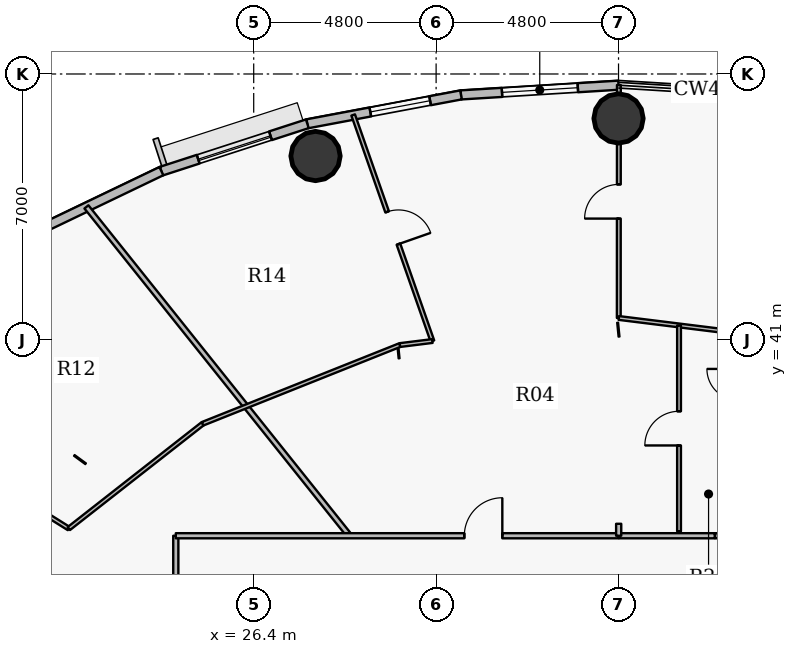
"""IFC4 building model, lengths in metres.
Left out: names, types, materials, properties, quantities, classifications, styles, units other than length and angle.
Written with IfcOpenShell. Run it as: python <this file> out.ifc"""

import sys

from ifc_helpers import new_model, si_unit, direction, frame, frame_2d, origin, origin_2d, place, context, subcontext, project, spatial, rectangle, hollow_circle, extrude, source, transform, mapped, element, fill, save


model = new_model("IFC4")
c1 = context("Model", 3, precision=1e-05, world=origin(), true_north=direction((0.0, 1.0)))
c2 = subcontext(c1, "Body", "Model", "MODEL_VIEW")
j1 = project(units=[si_unit("LENGTHUNIT", "METRE"), si_unit("PLANEANGLEUNIT", "RADIAN")], contexts=[c1])
p1 = place(None, origin())
s1 = spatial("IfcSite", under=j1, at=p1, CompositionType="ELEMENT")
p2 = place(p1, origin())
s2 = spatial("IfcBuilding", under=s1, at=p2, CompositionType="ELEMENT")
p3 = place(p2, frame((0.0, 0.0, 174.9)))
s3 = spatial("IfcBuildingStorey", under=s2, at=p3, CompositionType="ELEMENT", Elevation=174.9)
for number, where, z_axis, x_axis in (
    (1, (36.0, 46.83, 0.0), (0.0, 0.0, 1.0), (1.0, 0.0, 0.0)),
    (2, (28.027, 45.841, 0.0), (0.0, 0.0, 1.0), (1.0, 0.0, 0.0)),
):
    element("IfcColumn", number, at=place(p3, frame(where, z_axis=z_axis, x_axis=x_axis)), inside=s3, PredefinedType="COLUMN", context=c2, shape_type="SweptSolid", body=[
        extrude(hollow_circle(Radius=0.65, WallThickness=0.04, at=origin_2d()), origin(), (0.0, 0.0, 1.0), 3.75),
    ])
p4 = place(p3, frame((31.854, 47.449, 0.0), z_axis=(0.0, 0.0, 1.0), x_axis=(0.998104600619, 0.061540281305, 0.0)))
e3 = element("IfcWall", 3, at=p4, inside=s3, PredefinedType="SOLIDWALL", context=c2, shape_type="SweptSolid", body=[
    extrude(rectangle(XDim=4.154, YDim=0.24, at=frame_2d((2.077, 0.0))), origin(), (0.0, 0.0, 1.0), 3.5),
])
p5 = place(p4, frame((1.082, 0.0, 0.9)))
e4 = element("IfcOpeningElement", 4, at=p5, cuts=e3, PredefinedType="OPENING", context=c2, shape_type="SweptSolid", body=[
    extrude(rectangle(XDim=2.0, YDim=1.75, at=origin_2d()), frame((1.0, 0.13, 0.875), z_axis=(0.0, -1.0, 0.0), x_axis=(1.0, 0.0, 0.0)), (0.0, 0.0, 1.0), 0.26),
])
p6 = place(p3, frame((27.811, 46.689, 0.0), z_axis=(0.0, 0.0, 1.0), x_axis=(0.982788108205, 0.184736391573, 0.0)))
e5 = element("IfcWall", 5, at=p6, inside=s3, PredefinedType="SOLIDWALL", context=c2, shape_type="SweptSolid", body=[
    extrude(rectangle(XDim=4.114, YDim=0.24, at=frame_2d((2.057, 0.0))), origin(), (0.0, 0.0, 1.0), 3.5),
])
p7 = place(p6, frame((1.687, 0.0, 0.9)))
e6 = element("IfcOpeningElement", 6, at=p7, cuts=e5, PredefinedType="OPENING", context=c2, shape_type="SweptSolid", body=[
    extrude(rectangle(XDim=1.6, YDim=1.75, at=origin_2d()), frame((0.8, 0.13, 0.875), z_axis=(0.0, -1.0, 0.0), x_axis=(1.0, 0.0, 0.0)), (0.0, 0.0, 1.0), 0.26),
])
p8 = place(p3, frame((23.97, 45.444, 0.0), z_axis=(0.0, 0.0, 1.0), x_axis=(0.951209870236, 0.30854462038, 0.0)))
e7 = element("IfcWall", 7, at=p8, inside=s3, PredefinedType="SOLIDWALL", context=c2, shape_type="SweptSolid", body=[
    extrude(rectangle(XDim=4.038, YDim=0.24, at=frame_2d((2.019, 0.0))), origin(), (0.0, 0.0, 1.0), 3.5),
])
p9 = place(p8, frame((1.019, 0.0, 0.9)))
e8 = element("IfcOpeningElement", 8, at=p9, cuts=e7, PredefinedType="OPENING", context=c2, shape_type="SweptSolid", body=[
    extrude(rectangle(XDim=2.0, YDim=1.75, at=origin_2d()), frame((1.0, 0.13, 0.875), z_axis=(0.0, -1.0, 0.0), x_axis=(1.0, 0.0, 0.0)), (0.0, 0.0, 1.0), 0.26),
])
p10 = place(p3, frame((20.427, 43.743, 0.0), z_axis=(0.0, 0.0, 1.0), x_axis=(0.901564733809, 0.432644231155, 0.0)))
e9 = element("IfcWall", 9, at=p10, inside=s3, PredefinedType="SOLIDWALL", context=c2, shape_type="SweptSolid", body=[
    extrude(rectangle(XDim=3.93, YDim=0.24, at=frame_2d((1.965, 0.0))), origin(), (0.0, 0.0, 1.0), 3.5),
])
p11 = place(p3, frame((15.366, 39.894, 0.0), z_axis=(0.0, 0.0, 1.0), x_axis=(0.84804732756, -0.529920494242, 0.0)))
e10 = element("IfcWall", 10, at=p11, inside=s3, PredefinedType="PARTITIONING", context=c2, shape_type="SweptSolid", body=[
    extrude(rectangle(XDim=7.274, YDim=0.1, at=frame_2d((3.637, 0.0))), origin(), (0.0, 0.0, 1.0), 2.935),
])
p12 = place(p11, frame((3.187, 0.0, 0.0)))
e11 = element("IfcOpeningElement", 11, at=p12, cuts=e10, PredefinedType="OPENING", context=c2, shape_type="SweptSolid", body=[
    extrude(rectangle(XDim=0.9, YDim=2.1, at=origin_2d()), frame((0.45, 0.06, 1.05), z_axis=(0.0, -1.0, 0.0), x_axis=(1.0, 0.0, 0.0)), (0.0, 0.0, 1.0), 0.12),
])
p13 = place(p3, frame((21.534, 36.039, 0.0), z_axis=(0.0, 0.0, 1.0), x_axis=(0.787313734036, 0.616552580238, 0.0)))
e12 = element("IfcWall", 12, at=p13, inside=s3, PredefinedType="PARTITIONING", context=c2, shape_type="SweptSolid", body=[
    extrude(rectangle(XDim=4.472, YDim=0.1, at=frame_2d((2.236, 0.0))), origin(), (0.0, 0.0, 1.0), 2.935),
])
p14 = place(p3, frame((21.999, 44.503, 0.0), z_axis=(0.0, 0.0, 1.0), x_axis=(0.624673551917, -0.780886005468, 0.0)))
e13 = element("IfcWall", 13, at=p14, inside=s3, PredefinedType="PARTITIONING", context=c2, shape_type="SweptSolid", body=[
    extrude(rectangle(XDim=11.081, YDim=0.135, at=frame_2d((5.541, 0.0))), origin(), (0.0, 0.0, 1.0), 2.935),
])
p15 = place(p3, frame((24.35, 27.95, 0.0), z_axis=(0.0, 0.0, 1.0), x_axis=(0.0, 1.0, 0.0)))
e14 = element("IfcWall", 14, at=p15, inside=s3, PredefinedType="PARTITIONING", context=c2, shape_type="SweptSolid", body=[
    extrude(rectangle(XDim=7.9, YDim=0.135, at=frame_2d((3.95, 0.0))), origin(), (0.0, 0.0, 1.0), 2.935),
])
p16 = place(p15, frame((3.45, 0.0, 0.0)))
e15 = element("IfcOpeningElement", 15, at=p16, cuts=e14, PredefinedType="OPENING", context=c2, shape_type="SweptSolid", body=[
    extrude(rectangle(XDim=1.0, YDim=2.15, at=origin_2d()), frame((0.5, 0.078, 1.075), z_axis=(0.0, -1.0, 0.0), x_axis=(1.0, 0.0, 0.0)), (0.0, 0.0, 1.0), 0.155),
])
p17 = place(p3, frame((24.35, 35.85, 0.0), z_axis=(0.0, 0.0, 1.0), x_axis=(1.0, 0.0, 0.0)))
e16 = element("IfcWall", 16, at=p17, inside=s3, PredefinedType="PARTITIONING", context=c2, shape_type="SweptSolid", body=[
    extrude(rectangle(XDim=11.654, YDim=0.135, at=frame_2d((5.827, 0.0))), origin(), (0.0, 0.0, 1.0), 2.935),
])
p18 = place(p17, frame((7.592, 0.0, 0.0)))
e17 = element("IfcOpeningElement", 17, at=p18, cuts=e16, PredefinedType="OPENING", context=c2, shape_type="SweptSolid", body=[
    extrude(rectangle(XDim=1.0, YDim=2.15, at=origin_2d()), frame((0.5, 0.078, 1.075), z_axis=(0.0, -1.0, 0.0), x_axis=(1.0, 0.0, 0.0)), (0.0, 0.0, 1.0), 0.155),
])
p19 = place(p3, frame((25.055, 38.796, 0.0), z_axis=(0.0, 0.0, 1.0), x_axis=(0.928798710424, 0.370584613166, 0.0)))
e18 = element("IfcWall", 18, at=p19, inside=s3, PredefinedType="PARTITIONING", context=c2, shape_type="SweptSolid", body=[
    extrude(rectangle(XDim=5.589, YDim=0.1, at=frame_2d((2.794, 0.0))), origin(), (0.0, 0.0, 1.0), 2.935),
])
p20 = place(p3, frame((29.018, 46.921, 0.0), z_axis=(0.0, 0.0, 1.0), x_axis=(0.330774858624, -0.943709697366, 0.0)))
e19 = element("IfcWall", 19, at=p20, inside=s3, PredefinedType="PARTITIONING", context=c2, shape_type="SweptSolid", body=[
    extrude(rectangle(XDim=6.302, YDim=0.1, at=frame_2d((3.151, 0.0))), origin(), (0.0, 0.0, 1.0), 2.935),
])
p21 = place(p20, frame((2.701, 0.0, 0.0)))
e20 = element("IfcOpeningElement", 20, at=p21, cuts=e19, PredefinedType="OPENING", context=c2, shape_type="SweptSolid", body=[
    extrude(rectangle(XDim=0.9, YDim=2.1, at=origin_2d()), frame((0.45, 0.06, 1.05), z_axis=(0.0, -1.0, 0.0), x_axis=(1.0, 0.0, 0.0)), (0.0, 0.0, 1.0), 0.12),
])
p22 = place(p3, frame((30.246, 40.867, 0.0), z_axis=(0.0, 0.0, 1.0), x_axis=(0.992394974801, 0.123094329637, 0.0)))
e21 = element("IfcWall", 21, at=p22, inside=s3, PredefinedType="PARTITIONING", context=c2, shape_type="SweptSolid", body=[
    extrude(rectangle(XDim=0.863, YDim=0.1, at=frame_2d((0.431, 0.0))), origin(), (0.0, 0.0, 1.0), 2.935),
])
p23 = place(p3, frame((36.007, 41.58, 0.0), z_axis=(0.0, 0.0, 1.0), x_axis=(0.000477973338, 0.999999885771, 0.0)))
e22 = element("IfcWall", 22, at=p23, inside=s3, PredefinedType="PARTITIONING", context=c2, shape_type="SweptSolid", body=[
    extrude(rectangle(XDim=6.129, YDim=0.1, at=frame_2d((3.065, 0.0))), origin(), (0.0, 0.0, 1.0), 2.935),
])
p24 = place(p23, frame((2.615, 0.0, 0.0)))
e23 = element("IfcOpeningElement", 23, at=p24, cuts=e22, PredefinedType="OPENING", context=c2, shape_type="SweptSolid", body=[
    extrude(rectangle(XDim=0.9, YDim=2.1, at=origin_2d()), frame((0.45, 0.06, 1.05), z_axis=(0.0, -1.0, 0.0), x_axis=(1.0, 0.0, 0.0)), (0.0, 0.0, 1.0), 0.12),
])
p25 = place(p3, frame((36.007, 41.58, 0.0), z_axis=(0.0, 0.0, 1.0), x_axis=(0.992395965764, -0.123086340169, 0.0)))
e24 = element("IfcWall", 24, at=p25, inside=s3, PredefinedType="PARTITIONING", context=c2, shape_type="SweptSolid", body=[
    extrude(rectangle(XDim=4.943, YDim=0.1, at=frame_2d((2.471, 0.0))), origin(), (0.0, 0.0, 1.0), 2.935),
])
p26 = place(p3, frame((37.592, 35.968, 0.0), z_axis=(0.0, 0.0, 1.0), x_axis=(0.0, 1.0, 0.0)))
e25 = element("IfcWall", 25, at=p26, inside=s3, PredefinedType="PARTITIONING", context=c2, shape_type="SweptSolid", body=[
    extrude(rectangle(XDim=5.416, YDim=0.1, at=frame_2d((2.708, 0.0))), origin(), (0.0, 0.0, 1.0), 3.5),
])
p27 = place(p26, frame((2.258, 0.0, 0.0)))
e26 = element("IfcOpeningElement", 26, at=p27, cuts=e25, PredefinedType="OPENING", context=c2, shape_type="SweptSolid", body=[
    extrude(rectangle(XDim=0.9, YDim=2.1, at=origin_2d()), frame((0.45, 0.06, 1.05), z_axis=(0.0, -1.0, 0.0), x_axis=(1.0, 0.0, 0.0)), (0.0, 0.0, 1.0), 0.12),
])
p28 = place(p3, frame((38.541, 35.85, 0.0), z_axis=(0.0, 0.0, 1.0), x_axis=(1.0, 0.0, 0.0)))
e27 = element("IfcWall", 27, at=p28, inside=s3, PredefinedType="PARTITIONING", context=c2, shape_type="SweptSolid", body=[
    extrude(rectangle(XDim=14.913, YDim=0.135, at=frame_2d((7.456, 0.0))), origin(), (0.0, 0.0, 1.0), 2.935),
])
p29 = place(p28, frame((5.868, 0.0, 0.0)))
e28 = element("IfcOpeningElement", 28, at=p29, cuts=e27, PredefinedType="OPENING", context=c2, shape_type="SweptSolid", body=[
    extrude(rectangle(XDim=1.0, YDim=2.15, at=origin_2d()), frame((0.5, 0.078, 1.075), z_axis=(0.0, -1.0, 0.0), x_axis=(1.0, 0.0, 0.0)), (0.0, 0.0, 1.0), 0.155),
])
p30 = place(p3, frame((36.014, 35.85, 0.0), z_axis=(0.0, 0.0, 1.0), x_axis=(1.0, 0.0, 0.0)))
e29 = element("IfcWall", 29, at=p30, inside=s3, PredefinedType="PARTITIONING", context=c2, shape_type="SweptSolid", body=[
    extrude(rectangle(XDim=2.517, YDim=0.135, at=frame_2d((1.259, 0.0))), origin(), (0.0, 0.0, 1.0), 2.935),
])
p31 = place(p3, frame((36.004, 36.165, 0.0), z_axis=(0.0, 0.0, 1.0), x_axis=(0.0, -1.0, 0.0)))
e30 = element("IfcWall", 30, at=p31, inside=s3, PredefinedType="PARTITIONING", context=c2, shape_type="SweptSolid", body=[
    extrude(rectangle(XDim=0.315, YDim=0.135, at=frame_2d((0.157, 0.0))), origin(), (0.0, 0.0, 1.0), 2.935),
])
m1 = source(origin(), c2, "Body", "SweptSolid", [
    extrude(rectangle(XDim=2.0, YDim=1.75, at=origin_2d()), frame((1.0, 0.03, 0.875), z_axis=(0.0, -1.0, 0.0), x_axis=(1.0, 0.0, 0.0)), (0.0, 0.0, 1.0), 0.06),
])
p32 = place(p5, origin())
e31 = element("IfcWindow", 31, at=p32, inside=s3, PartitioningType="DOUBLE_PANEL_VERTICAL", PredefinedType="WINDOW", context=c2, shape_type="MappedRepresentation", body=[
    mapped(m1, transform((0.0, 0.0, 0.0), x_axis=(1.0, 0.0, 0.0), y_axis=(0.0, 1.0, 0.0), z_axis=(0.0, 0.0, 1.0), scale=1.0)),
])
fill(e4, e31)
m2 = source(origin(), c2, "Body", "SweptSolid", [
    extrude(rectangle(XDim=1.6, YDim=1.75, at=origin_2d()), frame((0.8, 0.03, 0.875), z_axis=(0.0, -1.0, 0.0), x_axis=(1.0, 0.0, 0.0)), (0.0, 0.0, 1.0), 0.06),
])
p33 = place(p7, origin())
e32 = element("IfcWindow", 32, at=p33, inside=s3, PartitioningType="DOUBLE_PANEL_VERTICAL", PredefinedType="WINDOW", context=c2, shape_type="MappedRepresentation", body=[
    mapped(m2, transform((0.0, 0.0, 0.0), x_axis=(1.0, 0.0, 0.0), y_axis=(0.0, 1.0, 0.0), z_axis=(0.0, 0.0, 1.0), scale=1.0)),
])
fill(e6, e32)
p34 = place(p9, origin())
e33 = element("IfcWindow", 33, at=p34, inside=s3, PartitioningType="DOUBLE_PANEL_VERTICAL", PredefinedType="WINDOW", context=c2, shape_type="MappedRepresentation", body=[
    mapped(m1, transform((0.0, 0.0, 0.0), x_axis=(1.0, 0.0, 0.0), y_axis=(0.0, 1.0, 0.0), z_axis=(0.0, 0.0, 1.0), scale=1.0)),
])
fill(e8, e33)
m3 = source(origin(), c2, "Body", "SweptSolid", [
    extrude(rectangle(XDim=1.0, YDim=2.15, at=origin_2d()), frame((0.5, 0.025, 1.075), z_axis=(0.0, -1.0, 0.0), x_axis=(1.0, 0.0, 0.0)), (0.0, 0.0, 1.0), 0.05),
])
p35 = place(p18, origin())
e34 = element("IfcDoor", 34, at=p35, inside=s3, OperationType="SINGLE_SWING_RIGHT", PredefinedType="DOOR", context=c2, shape_type="MappedRepresentation", body=[
    mapped(m3, transform((0.0, 0.0, 0.0), x_axis=(1.0, 0.0, 0.0), y_axis=(0.0, 1.0, 0.0), z_axis=(0.0, 0.0, 1.0), scale=1.0)),
])
fill(e17, e34)
m4 = source(origin(), c2, "Body", "SweptSolid", [
    extrude(rectangle(XDim=0.9, YDim=2.1, at=origin_2d()), frame((0.45, 0.025, 1.05), z_axis=(0.0, -1.0, 0.0), x_axis=(1.0, 0.0, 0.0)), (0.0, 0.0, 1.0), 0.05),
])
p36 = place(p24, origin())
e35 = element("IfcDoor", 35, at=p36, inside=s3, OperationType="SINGLE_SWING_LEFT", PredefinedType="DOOR", context=c2, shape_type="MappedRepresentation", body=[
    mapped(m4, transform((0.0, 0.0, 0.0), x_axis=(1.0, 0.0, 0.0), y_axis=(0.0, 1.0, 0.0), z_axis=(0.0, 0.0, 1.0), scale=1.0)),
])
fill(e23, e35)
p37 = place(p21, origin())
e36 = element("IfcDoor", 36, at=p37, inside=s3, OperationType="SINGLE_SWING_RIGHT", PredefinedType="DOOR", context=c2, shape_type="MappedRepresentation", body=[
    mapped(m4, transform((0.0, 0.0, 0.0), x_axis=(1.0, 0.0, 0.0), y_axis=(0.0, 1.0, 0.0), z_axis=(0.0, 0.0, 1.0), scale=1.0)),
])
fill(e20, e36)
p38 = place(p27, origin())
e37 = element("IfcDoor", 37, at=p38, inside=s3, OperationType="SINGLE_SWING_LEFT", PredefinedType="DOOR", context=c2, shape_type="MappedRepresentation", body=[
    mapped(m4, transform((0.0, 0.0, 0.0), x_axis=(1.0, 0.0, 0.0), y_axis=(0.0, 1.0, 0.0), z_axis=(0.0, 0.0, 1.0), scale=1.0)),
])
fill(e26, e37)
save(model, sys.argv[1])
